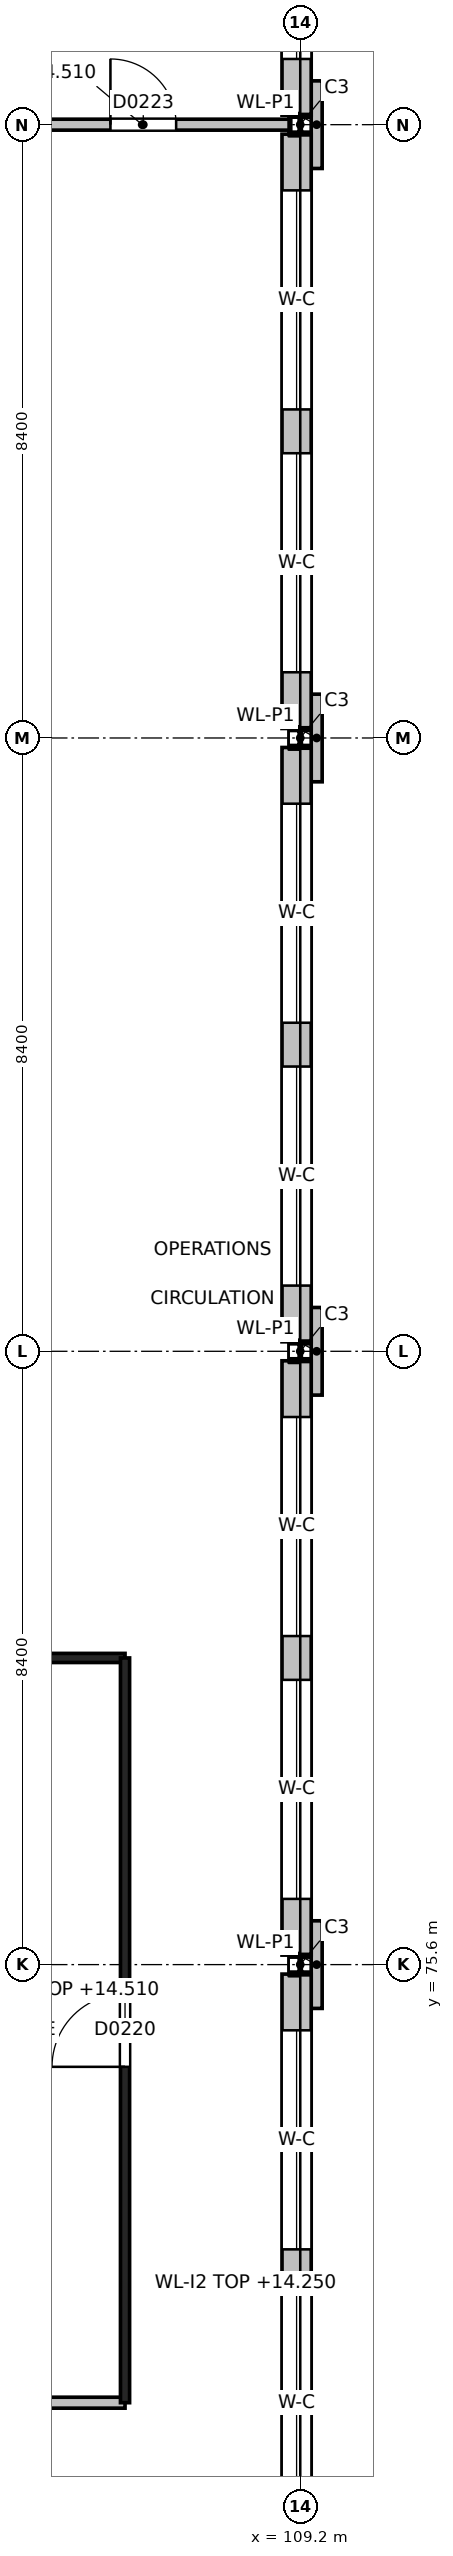
"""IFC4 building model, lengths in metres.
Left out: names, types, materials, properties, quantities, classifications, styles, units other than length and angle.
Written with IfcOpenShell. Run it as: python <this file> out.ifc"""

import sys

from ifc_helpers import new_model, si_unit, direction, frame, frame_2d, origin, origin_2d, place, context, subcontext, project, spatial, rectangle, i_section, extrude, element, fill, save


model = new_model("IFC4")
c1 = context("Model", 3, precision=1e-05, world=origin(), true_north=direction((0.0, 1.0)))
c2 = subcontext(c1, "Body", "Model", "MODEL_VIEW")
j1 = project(units=[si_unit("LENGTHUNIT", "METRE"), si_unit("PLANEANGLEUNIT", "RADIAN")], contexts=[c1])
p1 = place(None, origin())
s1 = spatial("IfcSite", under=j1, at=p1, CompositionType="ELEMENT")
p2 = place(p1, origin())
s2 = spatial("IfcBuilding", under=s1, at=p2, CompositionType="ELEMENT")
p3 = place(p2, frame((0.0, 0.0, 10.8)))
s3 = spatial("IfcBuildingStorey", under=s2, at=p3, CompositionType="ELEMENT", Elevation=10.8)
for number, where, z_axis, x_axis in (
    (1, (109.2, 75.6, 0.0), (0.0, 0.0, 1.0), (1.0, 0.0, 0.0)),
    (2, (109.2, 84.0, 0.0), (0.0, 0.0, 1.0), (1.0, 0.0, 0.0)),
    (3, (109.2, 92.4, 0.0), (0.0, 0.0, 1.0), (1.0, 0.0, 0.0)),
    (4, (109.2, 100.8, 0.0), (0.0, 0.0, 1.0), (1.0, 0.0, 0.0)),
):
    element("IfcColumn", number, at=place(p3, frame(where, z_axis=z_axis, x_axis=x_axis)), inside=s3, PredefinedType="COLUMN", context=c2, shape_type="SweptSolid", body=[
        extrude(i_section(OverallWidth=0.26, OverallDepth=0.26, WebThickness=0.01, FlangeThickness=0.018, at=origin_2d()), origin(), (0.0, 0.0, 1.0), 4.2),
    ])
p4 = place(p3, frame((109.15, 67.0, 0.0), z_axis=(0.0, 0.0, 1.0), x_axis=(0.0, 1.0, 0.0)))
e5 = element("IfcWall", 5, at=p4, inside=s3, PredefinedType="SOLIDWALL", context=c2, shape_type="SweptSolid", body=[
    extrude(rectangle(XDim=8.47, YDim=0.4, at=frame_2d((4.235, 0.0))), origin(), (0.0, 0.0, 1.0), 3.45),
])
p5 = place(p4, frame((1.1, 0.0, 0.9)))
e6 = element("IfcOpeningElement", 6, at=p5, cuts=e5, PredefinedType="OPENING", context=c2, shape_type="SweptSolid", body=[
    extrude(rectangle(XDim=3.0, YDim=2.4, at=frame_2d((1.5, 1.2))), frame((0.0, 0.2, 0.0), z_axis=(0.0, -1.0, 0.0), x_axis=(1.0, 0.0, 0.0)), (0.0, 0.0, 1.0), 0.4),
])
p6 = place(p4, frame((4.7, 0.0, 0.9)))
e7 = element("IfcOpeningElement", 7, at=p6, cuts=e5, PredefinedType="OPENING", context=c2, shape_type="SweptSolid", body=[
    extrude(rectangle(XDim=3.0, YDim=2.4, at=frame_2d((1.5, 1.2))), frame((0.0, 0.2, 0.0), z_axis=(0.0, -1.0, 0.0), x_axis=(1.0, 0.0, 0.0)), (0.0, 0.0, 1.0), 0.4),
])
p7 = place(p3, frame((109.15, 75.73, 0.0), z_axis=(0.0, 0.0, 1.0), x_axis=(0.0, 1.0, 0.0)))
e8 = element("IfcWall", 8, at=p7, inside=s3, PredefinedType="SOLIDWALL", context=c2, shape_type="SweptSolid", body=[
    extrude(rectangle(XDim=8.14, YDim=0.4, at=frame_2d((4.07, 0.0))), origin(), (0.0, 0.0, 1.0), 3.45),
])
p8 = place(p7, frame((0.77, 0.0, 0.9)))
e9 = element("IfcOpeningElement", 9, at=p8, cuts=e8, PredefinedType="OPENING", context=c2, shape_type="SweptSolid", body=[
    extrude(rectangle(XDim=3.0, YDim=2.4, at=frame_2d((1.5, 1.2))), frame((0.0, 0.2, 0.0), z_axis=(0.0, -1.0, 0.0), x_axis=(1.0, 0.0, 0.0)), (0.0, 0.0, 1.0), 0.4),
])
p9 = place(p7, frame((4.37, 0.0, 0.9)))
e10 = element("IfcOpeningElement", 10, at=p9, cuts=e8, PredefinedType="OPENING", context=c2, shape_type="SweptSolid", body=[
    extrude(rectangle(XDim=3.0, YDim=2.4, at=frame_2d((1.5, 1.2))), frame((0.0, 0.2, 0.0), z_axis=(0.0, -1.0, 0.0), x_axis=(1.0, 0.0, 0.0)), (0.0, 0.0, 1.0), 0.4),
])
p10 = place(p3, frame((109.15, 84.13, 0.0), z_axis=(0.0, 0.0, 1.0), x_axis=(0.0, 1.0, 0.0)))
e11 = element("IfcWall", 11, at=p10, inside=s3, PredefinedType="SOLIDWALL", context=c2, shape_type="SweptSolid", body=[
    extrude(rectangle(XDim=8.14, YDim=0.4, at=frame_2d((4.07, 0.0))), origin(), (0.0, 0.0, 1.0), 3.45),
])
p11 = place(p10, frame((0.77, 0.0, 0.9)))
e12 = element("IfcOpeningElement", 12, at=p11, cuts=e11, PredefinedType="OPENING", context=c2, shape_type="SweptSolid", body=[
    extrude(rectangle(XDim=3.0, YDim=2.4, at=frame_2d((1.5, 1.2))), frame((0.0, 0.2, 0.0), z_axis=(0.0, -1.0, 0.0), x_axis=(1.0, 0.0, 0.0)), (0.0, 0.0, 1.0), 0.4),
])
p12 = place(p10, frame((4.37, 0.0, 0.9)))
e13 = element("IfcOpeningElement", 13, at=p12, cuts=e11, PredefinedType="OPENING", context=c2, shape_type="SweptSolid", body=[
    extrude(rectangle(XDim=3.0, YDim=2.4, at=frame_2d((1.5, 1.2))), frame((0.0, 0.2, 0.0), z_axis=(0.0, -1.0, 0.0), x_axis=(1.0, 0.0, 0.0)), (0.0, 0.0, 1.0), 0.4),
])
p13 = place(p3, frame((109.15, 92.53, 0.0), z_axis=(0.0, 0.0, 1.0), x_axis=(0.0, 1.0, 0.0)))
e14 = element("IfcWall", 14, at=p13, inside=s3, PredefinedType="SOLIDWALL", context=c2, shape_type="SweptSolid", body=[
    extrude(rectangle(XDim=8.14, YDim=0.4, at=frame_2d((4.07, 0.0))), origin(), (0.0, 0.0, 1.0), 3.45),
])
p14 = place(p13, frame((0.77, 0.0, 0.9)))
e15 = element("IfcOpeningElement", 15, at=p14, cuts=e14, PredefinedType="OPENING", context=c2, shape_type="SweptSolid", body=[
    extrude(rectangle(XDim=3.0, YDim=2.4, at=frame_2d((1.5, 1.2))), frame((0.0, 0.2, 0.0), z_axis=(0.0, -1.0, 0.0), x_axis=(1.0, 0.0, 0.0)), (0.0, 0.0, 1.0), 0.4),
])
p15 = place(p13, frame((4.37, 0.0, 0.9)))
e16 = element("IfcOpeningElement", 16, at=p15, cuts=e14, PredefinedType="OPENING", context=c2, shape_type="SweptSolid", body=[
    extrude(rectangle(XDim=3.0, YDim=2.4, at=frame_2d((1.5, 1.2))), frame((0.0, 0.2, 0.0), z_axis=(0.0, -1.0, 0.0), x_axis=(1.0, 0.0, 0.0)), (0.0, 0.0, 1.0), 0.4),
])
p16 = place(p3, frame((109.15, 100.93, 0.0), z_axis=(0.0, 0.0, 1.0), x_axis=(0.0, 1.0, 0.0)))
e17 = element("IfcWall", 17, at=p16, inside=s3, PredefinedType="SOLIDWALL", context=c2, shape_type="SweptSolid", body=[
    extrude(rectangle(XDim=8.14, YDim=0.4, at=frame_2d((4.07, 0.0))), origin(), (0.0, 0.0, 1.0), 3.45),
])
p17 = place(p16, frame((0.77, 0.0, 0.9)))
e18 = element("IfcOpeningElement", 18, at=p17, cuts=e17, PredefinedType="OPENING", context=c2, shape_type="SweptSolid", body=[
    extrude(rectangle(XDim=3.0, YDim=2.4, at=frame_2d((1.5, 1.2))), frame((0.0, 0.2, 0.0), z_axis=(0.0, -1.0, 0.0), x_axis=(1.0, 0.0, 0.0)), (0.0, 0.0, 1.0), 0.4),
])
p18 = place(p16, frame((4.37, 0.0, 0.9)))
e19 = element("IfcOpeningElement", 19, at=p18, cuts=e17, PredefinedType="OPENING", context=c2, shape_type="SweptSolid", body=[
    extrude(rectangle(XDim=3.0, YDim=2.4, at=frame_2d((1.5, 1.2))), frame((0.0, 0.2, 0.0), z_axis=(0.0, -1.0, 0.0), x_axis=(1.0, 0.0, 0.0)), (0.0, 0.0, 1.0), 0.4),
])
p19 = place(p3, frame((109.425, 75.0, 0.0), z_axis=(0.0, 0.0, 1.0), x_axis=(0.0, 1.0, 0.0)))
e20 = element("IfcWall", 20, at=p19, inside=s3, PredefinedType="SOLIDWALL", context=c2, shape_type="SweptSolid", body=[
    extrude(rectangle(XDim=1.2, YDim=0.15, at=frame_2d((0.6, 0.0))), origin(), (0.0, 0.0, 1.0), 4.2),
])
p20 = place(p3, frame((109.425, 83.4, 0.0), z_axis=(0.0, 0.0, 1.0), x_axis=(0.0, 1.0, 0.0)))
e21 = element("IfcWall", 21, at=p20, inside=s3, PredefinedType="SOLIDWALL", context=c2, shape_type="SweptSolid", body=[
    extrude(rectangle(XDim=1.2, YDim=0.15, at=frame_2d((0.6, 0.0))), origin(), (0.0, 0.0, 1.0), 4.2),
])
for number, where, z_axis, x_axis in (
    (22, (109.425, 91.8, 0.0), (0.0, 0.0, 1.0), (0.0, 1.0, 0.0)),
    (23, (109.425, 100.2, 0.0), (0.0, 0.0, 1.0), (0.0, 1.0, 0.0)),
):
    element("IfcWall", number, at=place(p3, frame(where, z_axis=z_axis, x_axis=x_axis)), inside=s3, PredefinedType="SOLIDWALL", context=c2, shape_type="SweptSolid", body=[
        extrude(rectangle(XDim=1.2, YDim=0.15, at=frame_2d((0.6, 0.0))), origin(), (0.0, 0.0, 1.0), 4.2),
    ])
p21 = place(p3, frame((100.8, 69.6, 0.0), z_axis=(0.0, 0.0, 1.0), x_axis=(1.0, 0.0, 0.0)))
e24 = element("IfcWall", 24, at=p21, inside=s3, PredefinedType="PARTITIONING", context=c2, shape_type="SweptSolid", body=[
    extrude(rectangle(XDim=6.0, YDim=0.15, at=frame_2d((3.0, 0.0))), origin(), (0.0, 0.0, 1.0), 3.68),
])
p22 = place(p3, frame((100.8, 79.8, 0.0), z_axis=(0.0, 0.0, 1.0), x_axis=(1.0, 0.0, 0.0)))
e25 = element("IfcWall", 25, at=p22, inside=s3, PredefinedType="PARTITIONING", context=c2, shape_type="SweptSolid", body=[
    extrude(rectangle(XDim=6.0, YDim=0.125, at=frame_2d((3.0, 0.0))), origin(), (0.0, 0.0, 1.0), 3.68),
])
p23 = place(p3, frame((106.8, 69.6, 0.0), z_axis=(0.0, 0.0, 1.0), x_axis=(0.0, 1.0, 0.0)))
e26 = element("IfcWall", 26, at=p23, inside=s3, PredefinedType="PARTITIONING", context=c2, shape_type="SweptSolid", body=[
    extrude(rectangle(XDim=10.2, YDim=0.125, at=frame_2d((5.1, 0.0))), origin(), (0.0, 0.0, 1.0), 3.71),
])
p24 = place(p23, frame((4.6, 0.0, 0.0)))
e27 = element("IfcOpeningElement", 27, at=p24, cuts=e26, PredefinedType="OPENING", context=c2, shape_type="SweptSolid", body=[
    extrude(rectangle(XDim=1.0, YDim=2.2, at=frame_2d((0.5, 1.1))), frame((0.0, 0.062, 0.0), z_axis=(0.0, -1.0, 0.0), x_axis=(1.0, 0.0, 0.0)), (0.0, 0.0, 1.0), 0.125),
])
p25 = place(p3, frame((105.0, 100.8, 0.0), z_axis=(0.0, 0.0, 1.0), x_axis=(1.0, 0.0, 0.0)))
e28 = element("IfcWall", 28, at=p25, inside=s3, PredefinedType="PARTITIONING", context=c2, shape_type="SweptSolid", body=[
    extrude(rectangle(XDim=4.07, YDim=0.15, at=frame_2d((2.035, 0.0))), origin(), (0.0, 0.0, 1.0), 3.71),
])
p26 = place(p25, frame((1.6, 0.0, 0.0)))
e29 = element("IfcOpeningElement", 29, at=p26, cuts=e28, PredefinedType="OPENING", context=c2, shape_type="SweptSolid", body=[
    extrude(rectangle(XDim=0.9, YDim=2.1, at=frame_2d((0.45, 1.05))), frame((0.0, 0.075, 0.0), z_axis=(0.0, -1.0, 0.0), x_axis=(1.0, 0.0, 0.0)), (0.0, 0.0, 1.0), 0.15),
])
p27 = place(p5, origin())
e30 = element("IfcWindow", 30, at=p27, inside=s3, PartitioningType="SINGLE_PANEL", PredefinedType="WINDOW", context=c2, shape_type="SweptSolid", body=[
    extrude(rectangle(XDim=3.0, YDim=2.4, at=frame_2d((1.5, 1.2))), frame((0.0, 0.03, 0.0), z_axis=(0.0, -1.0, 0.0), x_axis=(1.0, 0.0, 0.0)), (0.0, 0.0, 1.0), 0.06),
])
fill(e6, e30)
p28 = place(p6, origin())
e31 = element("IfcWindow", 31, at=p28, inside=s3, PartitioningType="SINGLE_PANEL", PredefinedType="WINDOW", context=c2, shape_type="SweptSolid", body=[
    extrude(rectangle(XDim=3.0, YDim=2.4, at=frame_2d((1.5, 1.2))), frame((0.0, 0.03, 0.0), z_axis=(0.0, -1.0, 0.0), x_axis=(1.0, 0.0, 0.0)), (0.0, 0.0, 1.0), 0.06),
])
fill(e7, e31)
p29 = place(p8, origin())
e32 = element("IfcWindow", 32, at=p29, inside=s3, PartitioningType="SINGLE_PANEL", PredefinedType="WINDOW", context=c2, shape_type="SweptSolid", body=[
    extrude(rectangle(XDim=3.0, YDim=2.4, at=frame_2d((1.5, 1.2))), frame((0.0, 0.03, 0.0), z_axis=(0.0, -1.0, 0.0), x_axis=(1.0, 0.0, 0.0)), (0.0, 0.0, 1.0), 0.06),
])
fill(e9, e32)
p30 = place(p9, origin())
e33 = element("IfcWindow", 33, at=p30, inside=s3, PartitioningType="SINGLE_PANEL", PredefinedType="WINDOW", context=c2, shape_type="SweptSolid", body=[
    extrude(rectangle(XDim=3.0, YDim=2.4, at=frame_2d((1.5, 1.2))), frame((0.0, 0.03, 0.0), z_axis=(0.0, -1.0, 0.0), x_axis=(1.0, 0.0, 0.0)), (0.0, 0.0, 1.0), 0.06),
])
fill(e10, e33)
p31 = place(p11, origin())
e34 = element("IfcWindow", 34, at=p31, inside=s3, PartitioningType="SINGLE_PANEL", PredefinedType="WINDOW", context=c2, shape_type="SweptSolid", body=[
    extrude(rectangle(XDim=3.0, YDim=2.4, at=frame_2d((1.5, 1.2))), frame((0.0, 0.03, 0.0), z_axis=(0.0, -1.0, 0.0), x_axis=(1.0, 0.0, 0.0)), (0.0, 0.0, 1.0), 0.06),
])
fill(e12, e34)
p32 = place(p12, origin())
e35 = element("IfcWindow", 35, at=p32, inside=s3, PartitioningType="SINGLE_PANEL", PredefinedType="WINDOW", context=c2, shape_type="SweptSolid", body=[
    extrude(rectangle(XDim=3.0, YDim=2.4, at=frame_2d((1.5, 1.2))), frame((0.0, 0.03, 0.0), z_axis=(0.0, -1.0, 0.0), x_axis=(1.0, 0.0, 0.0)), (0.0, 0.0, 1.0), 0.06),
])
fill(e13, e35)
p33 = place(p14, origin())
e36 = element("IfcWindow", 36, at=p33, inside=s3, PartitioningType="SINGLE_PANEL", PredefinedType="WINDOW", context=c2, shape_type="SweptSolid", body=[
    extrude(rectangle(XDim=3.0, YDim=2.4, at=frame_2d((1.5, 1.2))), frame((0.0, 0.03, 0.0), z_axis=(0.0, -1.0, 0.0), x_axis=(1.0, 0.0, 0.0)), (0.0, 0.0, 1.0), 0.06),
])
fill(e15, e36)
p34 = place(p15, origin())
e37 = element("IfcWindow", 37, at=p34, inside=s3, PartitioningType="SINGLE_PANEL", PredefinedType="WINDOW", context=c2, shape_type="SweptSolid", body=[
    extrude(rectangle(XDim=3.0, YDim=2.4, at=frame_2d((1.5, 1.2))), frame((0.0, 0.03, 0.0), z_axis=(0.0, -1.0, 0.0), x_axis=(1.0, 0.0, 0.0)), (0.0, 0.0, 1.0), 0.06),
])
fill(e16, e37)
p35 = place(p17, origin())
e38 = element("IfcWindow", 38, at=p35, inside=s3, PartitioningType="SINGLE_PANEL", PredefinedType="WINDOW", context=c2, shape_type="SweptSolid", body=[
    extrude(rectangle(XDim=3.0, YDim=2.4, at=frame_2d((1.5, 1.2))), frame((0.0, 0.03, 0.0), z_axis=(0.0, -1.0, 0.0), x_axis=(1.0, 0.0, 0.0)), (0.0, 0.0, 1.0), 0.06),
])
fill(e18, e38)
p36 = place(p24, origin())
e39 = element("IfcDoor", 39, at=p36, inside=s3, OperationType="SINGLE_SWING_LEFT", PredefinedType="DOOR", context=c2, shape_type="SweptSolid", body=[
    extrude(rectangle(XDim=1.0, YDim=2.2, at=frame_2d((0.5, 1.1))), frame((0.0, 0.025, 0.0), z_axis=(0.0, -1.0, 0.0), x_axis=(1.0, 0.0, 0.0)), (0.0, 0.0, 1.0), 0.05),
])
fill(e27, e39)
p37 = place(p26, origin())
e40 = element("IfcDoor", 40, at=p37, inside=s3, OperationType="SINGLE_SWING_LEFT", PredefinedType="DOOR", context=c2, shape_type="SweptSolid", body=[
    extrude(rectangle(XDim=0.9, YDim=2.1, at=frame_2d((0.45, 1.05))), frame((0.0, 0.025, 0.0), z_axis=(0.0, -1.0, 0.0), x_axis=(1.0, 0.0, 0.0)), (0.0, 0.0, 1.0), 0.05),
])
fill(e29, e40)
save(model, sys.argv[1])
